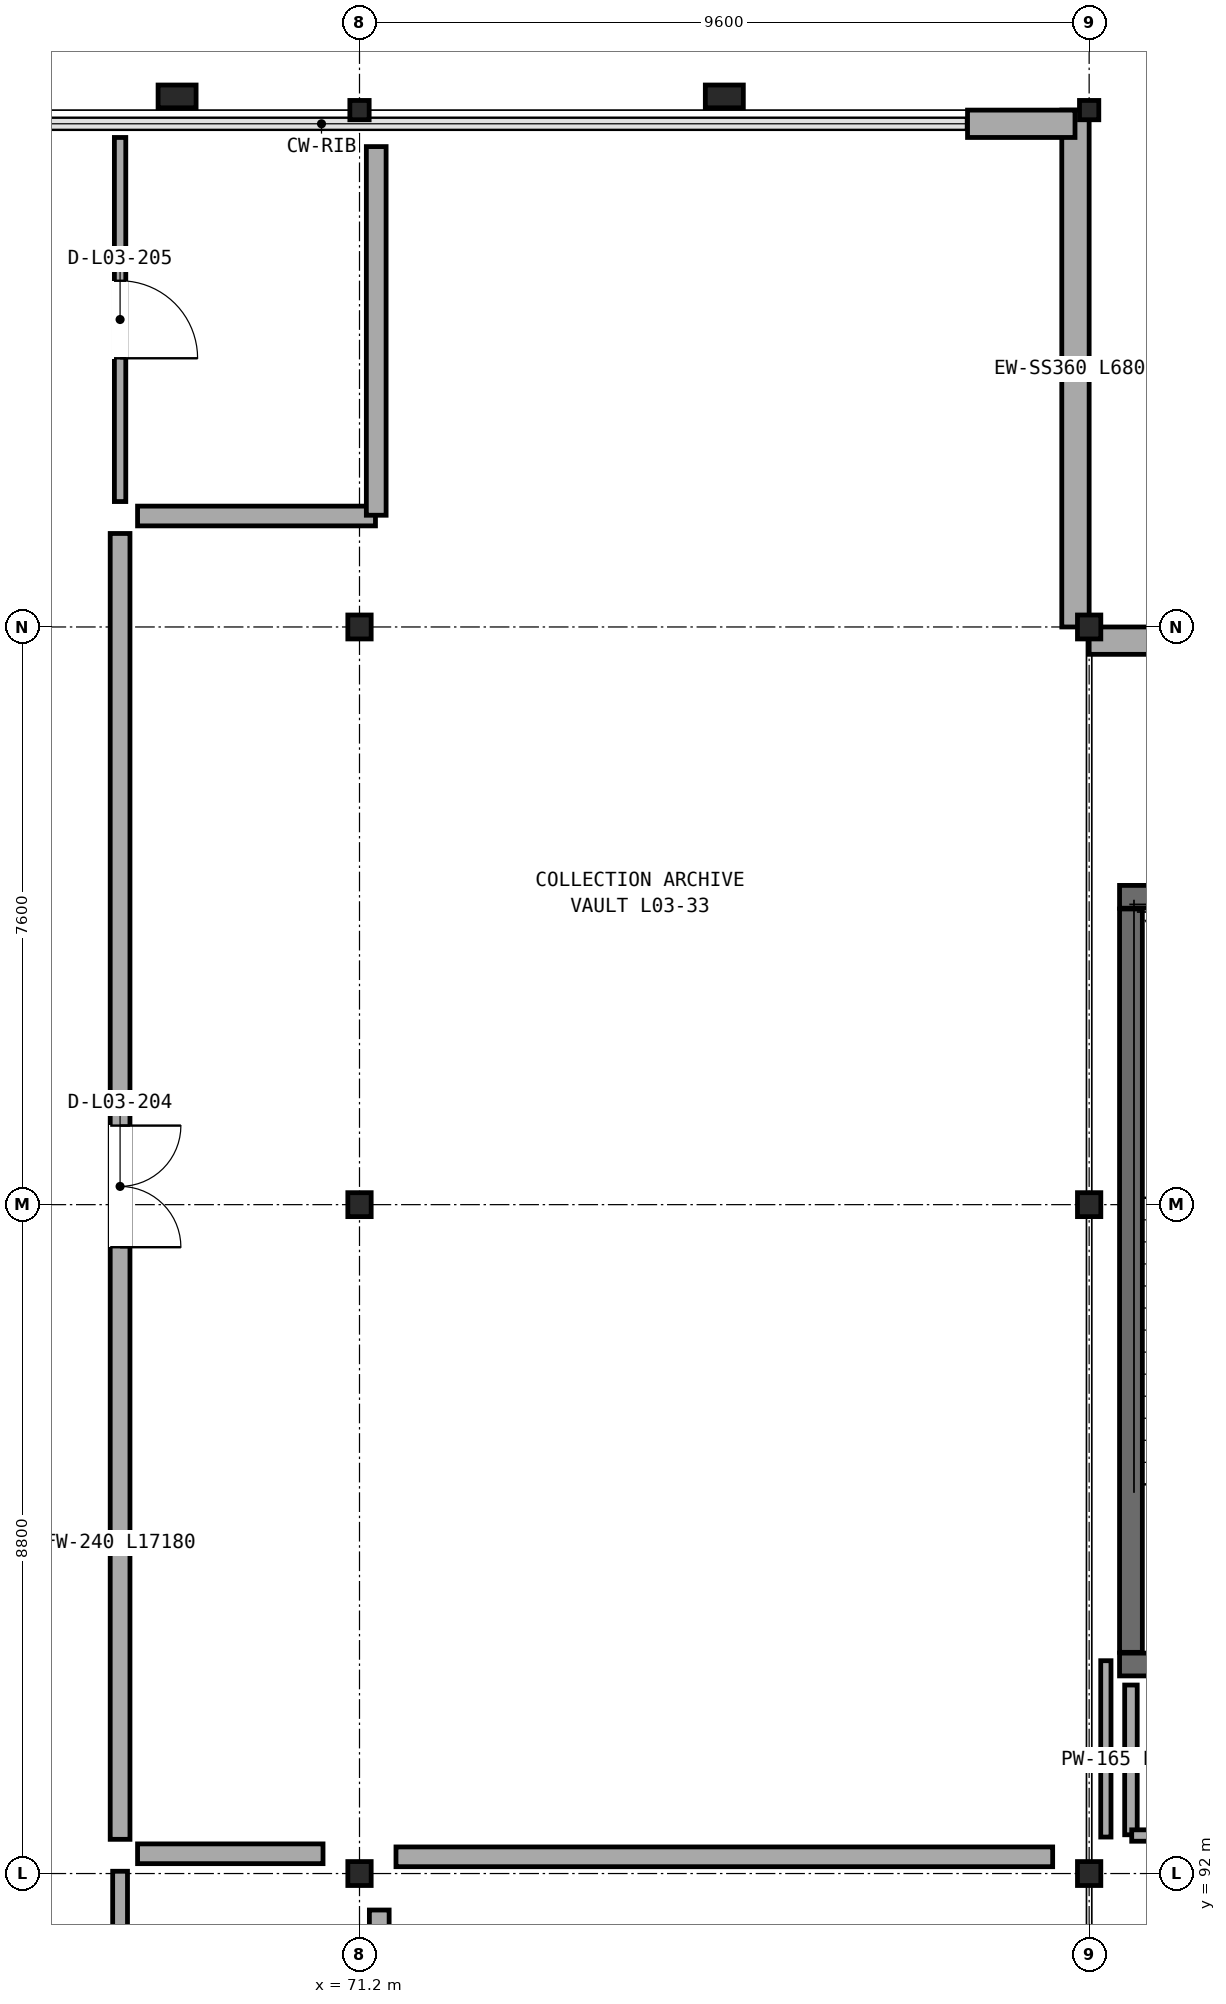
"""IFC4 building model, lengths in metres.
Left out: names, types, materials, properties, quantities, classifications, styles, units other than length and angle.
Written with IfcOpenShell. Run it as: python <this file> out.ifc"""

import sys

from ifc_helpers import new_model, si_unit, direction, frame, frame_2d, origin, origin_2d, place, context, subcontext, project, spatial, rectangle, i_section, extrude, element, fill, save


model = new_model("IFC4")
c1 = context("Model", 3, precision=1e-05, world=origin(), true_north=direction((0.0, 1.0)))
c2 = subcontext(c1, "Body", "Model", "MODEL_VIEW")
j1 = project(units=[si_unit("LENGTHUNIT", "METRE"), si_unit("PLANEANGLEUNIT", "RADIAN")], contexts=[c1])
p1 = place(None, origin())
s1 = spatial("IfcSite", under=j1, at=p1, CompositionType="ELEMENT")
p2 = place(p1, origin())
s2 = spatial("IfcBuilding", under=s1, at=p2, CompositionType="ELEMENT")
p3 = place(p2, frame((0.0, 0.0, 14.6)))
s3 = spatial("IfcBuildingStorey", under=s2, at=p3, CompositionType="ELEMENT", Elevation=14.6)
for number, where, z_axis, x_axis in (
    (1, (71.2, 92.0, 0.0), (0.0, 0.0, 1.0), (1.0, 0.0, 0.0)),
    (2, (71.2, 100.8, 0.0), (0.0, 0.0, 1.0), (1.0, 0.0, 0.0)),
    (3, (71.2, 108.4, 0.0), (0.0, 0.0, 1.0), (1.0, 0.0, 0.0)),
):
    element("IfcColumn", number, at=place(p3, frame(where, z_axis=z_axis, x_axis=x_axis)), inside=s3, PredefinedType="COLUMN", context=c2, shape_type="SweptSolid", body=[
        extrude(i_section(OverallWidth=0.307, OverallDepth=0.315, WebThickness=0.012, FlangeThickness=0.019, FilletRadius=0.017, at=origin_2d()), origin(), (0.0, 0.0, 1.0), 4.5),
    ])
p4 = place(p3, frame((71.2, 115.2, 0.0), z_axis=(0.0, 0.0, 1.0), x_axis=(1.0, 0.0, 0.0)))
e4 = element("IfcColumn", 4, at=p4, inside=s3, PredefinedType="COLUMN", context=c2, shape_type="SweptSolid", body=[
    extrude(i_section(OverallWidth=0.254, OverallDepth=0.254, WebThickness=0.009, FlangeThickness=0.014, FilletRadius=0.013, at=origin_2d()), origin(), (0.0, 0.0, 1.0), 4.5),
])
for number, where, z_axis, x_axis in (
    (5, (80.8, 92.0, 0.0), (0.0, 0.0, 1.0), (1.0, 0.0, 0.0)),
    (6, (80.8, 100.8, 0.0), (0.0, 0.0, 1.0), (1.0, 0.0, 0.0)),
    (7, (80.8, 108.4, 0.0), (0.0, 0.0, 1.0), (1.0, 0.0, 0.0)),
):
    element("IfcColumn", number, at=place(p3, frame(where, z_axis=z_axis, x_axis=x_axis)), inside=s3, PredefinedType="COLUMN", context=c2, shape_type="SweptSolid", body=[
        extrude(i_section(OverallWidth=0.307, OverallDepth=0.315, WebThickness=0.012, FlangeThickness=0.019, FilletRadius=0.017, at=origin_2d()), origin(), (0.0, 0.0, 1.0), 4.5),
    ])
p5 = place(p3, frame((80.8, 115.2, 0.0), z_axis=(0.0, 0.0, 1.0), x_axis=(1.0, 0.0, 0.0)))
e8 = element("IfcColumn", 8, at=p5, inside=s3, PredefinedType="COLUMN", context=c2, shape_type="SweptSolid", body=[
    extrude(i_section(OverallWidth=0.254, OverallDepth=0.254, WebThickness=0.009, FlangeThickness=0.014, FilletRadius=0.013, at=origin_2d()), origin(), (0.0, 0.0, 1.0), 4.5),
])
for number, where, z_axis, x_axis in (
    (9, (68.8, 115.38, 0.0), (0.0, 0.0, 1.0), (1.0, 0.0, 0.0)),
    (10, (76.0, 115.38, 0.0), (0.0, 0.0, 1.0), (1.0, 0.0, 0.0)),
):
    element("IfcColumn", number, at=place(p3, frame(where, z_axis=z_axis, x_axis=x_axis)), inside=s3, PredefinedType="PILASTER", context=c2, shape_type="SweptSolid", body=[
        extrude(rectangle(XDim=0.5, YDim=0.3, at=origin_2d()), origin(), (0.0, 0.0, 1.0), 4.29),
    ])
p6 = place(p3, frame((82.4, 108.22, 0.0), z_axis=(0.0, 0.0, 1.0), x_axis=(-1.0, 0.0, 0.0)))
e11 = element("IfcWall", 11, at=p6, inside=s3, PredefinedType="SOLIDWALL", context=c2, shape_type="SweptSolid", body=[
    extrude(rectangle(XDim=1.6, YDim=0.36, at=frame_2d((0.8, 0.0))), origin(), (0.0, 0.0, 1.0), 3.662),
])
p7 = place(p3, frame((80.62, 108.4, 0.0), z_axis=(0.0, 0.0, 1.0), x_axis=(0.0, 1.0, 0.0)))
e12 = element("IfcWall", 12, at=p7, inside=s3, PredefinedType="SOLIDWALL", context=c2, shape_type="SweptSolid", body=[
    extrude(rectangle(XDim=6.8, YDim=0.36, at=frame_2d((3.4, 0.0))), origin(), (0.0, 0.0, 1.0), 3.662),
])
p8 = place(p3, frame((80.614, 115.02, 0.0), z_axis=(0.0, 0.0, 1.0), x_axis=(-1.0, 0.0, 0.0)))
e13 = element("IfcWall", 13, at=p8, inside=s3, PredefinedType="SOLIDWALL", context=c2, shape_type="SweptSolid", body=[
    extrude(rectangle(XDim=1.414, YDim=0.36, at=frame_2d((0.707, 0.0))), origin(), (0.0, 0.0, 1.0), 3.818),
])
p9 = place(p3, frame((81.2, 94.75, 0.0), z_axis=(0.0, 0.0, 1.0), x_axis=(1.0, 0.0, 0.0)))
e14 = element("IfcWall", 14, at=p9, inside=s3, PredefinedType="SHEAR", context=c2, shape_type="SweptSolid", body=[
    extrude(rectangle(XDim=8.4, YDim=0.3, at=frame_2d((4.2, 0.0))), origin(), (0.0, 0.0, 1.0), 4.245),
])
p10 = place(p9, frame((1.925, 0.0, 0.0)))
e15 = element("IfcOpeningElement", 15, at=p10, cuts=e14, PredefinedType="OPENING", context=c2, shape_type="SweptSolid", body=[
    extrude(rectangle(XDim=1.25, YDim=2.2, at=frame_2d((0.625, 1.1))), frame((0.0, 0.16, 0.0), z_axis=(0.0, -1.0, 0.0), x_axis=(1.0, 0.0, 0.0)), (0.0, 0.0, 1.0), 0.32),
])
p11 = place(p9, frame((6.0, 0.0, 0.0)))
e16 = element("IfcOpeningElement", 16, at=p11, cuts=e14, PredefinedType="OPENING", context=c2, shape_type="SweptSolid", body=[
    extrude(rectangle(XDim=1.1, YDim=2.2, at=frame_2d((0.55, 1.1))), frame((0.0, 0.16, 0.0), z_axis=(0.0, -1.0, 0.0), x_axis=(1.0, 0.0, 0.0)), (0.0, 0.0, 1.0), 0.32),
])
p12 = place(p3, frame((89.6, 104.85, 0.0), z_axis=(0.0, 0.0, 1.0), x_axis=(-1.0, 0.0, 0.0)))
e17 = element("IfcWall", 17, at=p12, inside=s3, PredefinedType="SHEAR", context=c2, shape_type="SweptSolid", body=[
    extrude(rectangle(XDim=8.4, YDim=0.3, at=frame_2d((4.2, 0.0))), origin(), (0.0, 0.0, 1.0), 4.245),
])
p13 = place(p12, frame((1.3, 0.0, 0.0)))
e18 = element("IfcOpeningElement", 18, at=p13, cuts=e17, PredefinedType="OPENING", context=c2, shape_type="SweptSolid", body=[
    extrude(rectangle(XDim=1.1, YDim=2.2, at=frame_2d((0.55, 1.1))), frame((0.0, 0.16, 0.0), z_axis=(0.0, -1.0, 0.0), x_axis=(1.0, 0.0, 0.0)), (0.0, 0.0, 1.0), 0.32),
])
p14 = place(p3, frame((81.35, 104.69, 0.0), z_axis=(0.0, 0.0, 1.0), x_axis=(0.0, -1.0, 0.0)))
e19 = element("IfcWall", 19, at=p14, inside=s3, PredefinedType="SHEAR", context=c2, shape_type="SweptSolid", body=[
    extrude(rectangle(XDim=9.78, YDim=0.3, at=frame_2d((4.89, 0.0))), origin(), (0.0, 0.0, 1.0), 4.245),
])
p15 = place(p3, frame((81.35, 94.48, 0.0), z_axis=(0.0, 0.0, 1.0), x_axis=(0.0, -1.0, 0.0)))
e20 = element("IfcWall", 20, at=p15, inside=s3, PredefinedType="PARTITIONING", context=c2, shape_type="SweptSolid", body=[
    extrude(rectangle(XDim=1.97, YDim=0.165, at=frame_2d((0.985, 0.0))), origin(), (0.0, 0.0, 1.0), 4.13),
])
p16 = place(p3, frame((81.36, 92.5, 0.0), z_axis=(0.0, 0.0, 1.0), x_axis=(1.0, 0.0, 0.0)))
e21 = element("IfcWall", 21, at=p16, inside=s3, PredefinedType="PARTITIONING", context=c2, shape_type="SweptSolid", body=[
    extrude(rectangle(XDim=8.697, YDim=0.15, at=frame_2d((4.349, 0.0))), origin(), (0.0, 0.0, 1.0), 4.13),
])
p17 = place(p3, frame((81.02, 92.48, 0.0), z_axis=(0.0, 0.0, 1.0), x_axis=(0.0, 1.0, 0.0)))
e22 = element("IfcWall", 22, at=p17, inside=s3, PredefinedType="PARTITIONING", context=c2, shape_type="SweptSolid", body=[
    extrude(rectangle(XDim=2.32, YDim=0.135, at=frame_2d((1.16, 0.0))), origin(), (0.0, 0.0, 1.0), 3.723),
])
p18 = place(p3, frame((68.05, 79.88, 0.0), z_axis=(0.0, 0.0, 1.0), x_axis=(0.0, 1.0, 0.0)))
e23 = element("IfcWall", 23, at=p18, inside=s3, PredefinedType="PARTITIONING", context=c2, shape_type="SweptSolid", body=[
    extrude(rectangle(XDim=12.15, YDim=0.195, at=frame_2d((6.075, 0.0))), origin(), (0.0, 0.0, 1.0), 3.647),
])
p19 = place(p18, frame((5.405, 0.0, 0.0)))
e24 = element("IfcOpeningElement", 24, at=p19, cuts=e23, PredefinedType="OPENING", context=c2, shape_type="SweptSolid", body=[
    extrude(rectangle(XDim=1.34, YDim=2.16, at=frame_2d((0.67, 1.08))), frame((0.0, 0.107, 0.0), z_axis=(0.0, -1.0, 0.0), x_axis=(1.0, 0.0, 0.0)), (0.0, 0.0, 1.0), 0.215),
])
p20 = place(p3, frame((68.05, 92.45, 0.0), z_axis=(0.0, 0.0, 1.0), x_axis=(0.0, 1.0, 0.0)))
e25 = element("IfcWall", 25, at=p20, inside=s3, PredefinedType="SOLIDWALL", context=c2, shape_type="SweptSolid", body=[
    extrude(rectangle(XDim=17.18, YDim=0.26, at=frame_2d((8.59, 0.0))), origin(), (0.0, 0.0, 1.0), 3.647),
])
p21 = place(p20, frame((7.79, 0.0, 0.0)))
e26 = element("IfcOpeningElement", 26, at=p21, cuts=e25, PredefinedType="OPENING", context=c2, shape_type="SweptSolid", body=[
    extrude(rectangle(XDim=1.6, YDim=2.4, at=frame_2d((0.8, 1.2))), frame((0.0, 0.14, 0.0), z_axis=(0.0, -1.0, 0.0), x_axis=(1.0, 0.0, 0.0)), (0.0, 0.0, 1.0), 0.28),
])
p22 = place(p3, frame((68.05, 110.05, 0.0), z_axis=(0.0, 0.0, 1.0), x_axis=(0.0, 1.0, 0.0)))
e27 = element("IfcWall", 27, at=p22, inside=s3, PredefinedType="PARTITIONING", context=c2, shape_type="SweptSolid", body=[
    extrude(rectangle(XDim=4.79, YDim=0.15, at=frame_2d((2.395, 0.0))), origin(), (0.0, 0.0, 1.0), 2.9),
])
p23 = place(p22, frame((1.885, 0.0, 0.0)))
e28 = element("IfcOpeningElement", 28, at=p23, cuts=e27, PredefinedType="OPENING", context=c2, shape_type="SweptSolid", body=[
    extrude(rectangle(XDim=1.02, YDim=2.24, at=frame_2d((0.51, 1.12))), frame((0.0, 0.085, 0.0), z_axis=(0.0, -1.0, 0.0), x_axis=(1.0, 0.0, 0.0)), (0.0, 0.0, 1.0), 0.17),
])
p24 = place(p3, frame((68.28, 92.26, 0.0), z_axis=(0.0, 0.0, 1.0), x_axis=(1.0, 0.0, 0.0)))
e29 = element("IfcWall", 29, at=p24, inside=s3, PredefinedType="SOLIDWALL", context=c2, shape_type="SweptSolid", body=[
    extrude(rectangle(XDim=2.44, YDim=0.26, at=frame_2d((1.22, 0.0))), origin(), (0.0, 0.0, 1.0), 3.647),
])
p25 = place(p3, frame((71.46, 91.52, 0.0), z_axis=(0.0, 0.0, 1.0), x_axis=(0.0, -1.0, 0.0)))
e30 = element("IfcWall", 30, at=p25, inside=s3, PredefinedType="SOLIDWALL", context=c2, shape_type="SweptSolid", body=[
    extrude(rectangle(XDim=11.64, YDim=0.26, at=frame_2d((5.82, 0.0))), origin(), (0.0, 0.0, 1.0), 3.647),
])
p26 = place(p3, frame((68.28, 109.86, 0.0), z_axis=(0.0, 0.0, 1.0), x_axis=(1.0, 0.0, 0.0)))
e31 = element("IfcWall", 31, at=p26, inside=s3, PredefinedType="SOLIDWALL", context=c2, shape_type="SweptSolid", body=[
    extrude(rectangle(XDim=3.13, YDim=0.26, at=frame_2d((1.565, 0.0))), origin(), (0.0, 0.0, 1.0), 3.803),
])
p27 = place(p3, frame((71.42, 109.87, 0.0), z_axis=(0.0, 0.0, 1.0), x_axis=(0.0, 1.0, 0.0)))
e32 = element("IfcWall", 32, at=p27, inside=s3, PredefinedType="SOLIDWALL", context=c2, shape_type="SweptSolid", body=[
    extrude(rectangle(XDim=4.85, YDim=0.26, at=frame_2d((2.425, 0.0))), origin(), (0.0, 0.0, 1.0), 2.9),
])
p28 = place(p3, frame((80.32, 92.22, 0.0), z_axis=(0.0, 0.0, 1.0), x_axis=(-1.0, 0.0, 0.0)))
e33 = element("IfcWall", 33, at=p28, inside=s3, PredefinedType="SOLIDWALL", context=c2, shape_type="SweptSolid", body=[
    extrude(rectangle(XDim=8.64, YDim=0.26, at=frame_2d((4.32, 0.0))), origin(), (0.0, 0.0, 1.0), 3.647),
])
p29 = place(p21, frame((1.6, 0.0, 0.0), z_axis=(0.0, 0.0, 1.0), x_axis=(-1.0, 0.0, 0.0)))
e34 = element("IfcDoor", 34, at=p29, inside=s3, OperationType="DOUBLE_DOOR_SINGLE_SWING", PredefinedType="DOOR", context=c2, shape_type="SweptSolid", body=[
    extrude(rectangle(XDim=1.6, YDim=2.4, at=frame_2d((0.8, 1.2))), frame((0.0, 0.025, 0.0), z_axis=(0.0, -1.0, 0.0), x_axis=(1.0, 0.0, 0.0)), (0.0, 0.0, 1.0), 0.05),
])
fill(e26, e34)
p30 = place(p23, frame((1.02, 0.0, 0.0), z_axis=(0.0, 0.0, 1.0), x_axis=(-1.0, 0.0, 0.0)))
e35 = element("IfcDoor", 35, at=p30, inside=s3, OperationType="SINGLE_SWING_LEFT", PredefinedType="DOOR", context=c2, shape_type="SweptSolid", body=[
    extrude(rectangle(XDim=1.02, YDim=2.24, at=frame_2d((0.51, 1.12))), frame((0.0, 0.025, 0.0), z_axis=(0.0, -1.0, 0.0), x_axis=(1.0, 0.0, 0.0)), (0.0, 0.0, 1.0), 0.05),
])
fill(e28, e35)
save(model, sys.argv[1])
